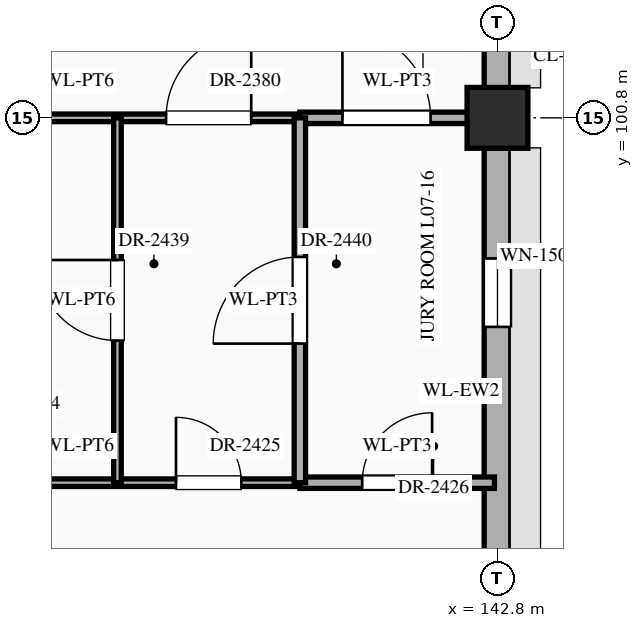
"""IFC4 building model, lengths in metres.
Left out: names, types, materials, properties, quantities, classifications, styles, units other than length and angle.
Written with IfcOpenShell. Run it as: python <this file> out.ifc"""

import sys

from ifc_helpers import new_model, si_unit, direction, frame, frame_2d, origin, origin_2d, place, context, subcontext, project, spatial, rectangle, extrude, element, fill, save


model = new_model("IFC4")
c1 = context("Model", 3, precision=1e-05, world=origin(), true_north=direction((0.0, 1.0)))
c2 = subcontext(c1, "Body", "Model", "MODEL_VIEW")
j1 = project(units=[si_unit("LENGTHUNIT", "METRE"), si_unit("PLANEANGLEUNIT", "RADIAN")], contexts=[c1])
p1 = place(None, origin())
s1 = spatial("IfcSite", under=j1, at=p1, CompositionType="ELEMENT")
p2 = place(p1, origin())
s2 = spatial("IfcBuilding", under=s1, at=p2, CompositionType="ELEMENT")
p3 = place(p2, frame((0.0, 0.0, 30.6)))
s3 = spatial("IfcBuildingStorey", under=s2, at=p3, CompositionType="ELEMENT", Elevation=30.6)
p4 = place(p3, frame((142.8, 100.8, 0.0), z_axis=(0.0, 0.0, 1.0), x_axis=(1.0, 0.0, 0.0)))
e1 = element("IfcColumn", 1, at=p4, inside=s3, PredefinedType="COLUMN", context=c2, shape_type="SweptSolid", body=[
    extrude(rectangle(XDim=0.8, YDim=0.8, at=origin_2d()), origin(), (0.0, 0.0, 1.0), 4.5),
])
p5 = place(p3, frame((142.8, 93.995, 0.0), z_axis=(0.0, 0.0, 1.0), x_axis=(0.0, 1.0, 0.0)))
e2 = element("IfcWall", 2, at=p5, inside=s3, PredefinedType="STANDARD", context=c2, shape_type="SweptSolid", body=[
    extrude(rectangle(XDim=6.41, YDim=0.35, at=frame_2d((3.205, 0.0))), origin(), (0.0, 0.0, 1.0), 3.65),
])
p6 = place(p5, frame((4.055, 0.0, 0.85)))
e3 = element("IfcOpeningElement", 3, at=p6, cuts=e2, PredefinedType="OPENING", context=c2, shape_type="SweptSolid", body=[
    extrude(rectangle(XDim=0.9, YDim=2.12, at=frame_2d((0.45, 1.06))), frame((0.0, 0.187, 0.0), z_axis=(0.0, -1.0, 0.0), x_axis=(1.0, 0.0, 0.0)), (0.0, 0.0, 1.0), 0.374),
])
p7 = place(p3, frame((142.8, 101.195, 0.0), z_axis=(0.0, 0.0, 1.0), x_axis=(0.0, 1.0, 0.0)))
e4 = element("IfcWall", 4, at=p7, inside=s3, PredefinedType="STANDARD", context=c2, shape_type="SweptSolid", body=[
    extrude(rectangle(XDim=6.41, YDim=0.35, at=frame_2d((3.205, 0.0))), origin(), (0.0, 0.0, 1.0), 3.65),
])
p8 = place(p7, frame((3.98, 0.0, 0.85)))
e5 = element("IfcOpeningElement", 5, at=p8, cuts=e4, PredefinedType="OPENING", context=c2, shape_type="SweptSolid", body=[
    extrude(rectangle(XDim=1.05, YDim=1.2, at=frame_2d((0.525, 0.6))), frame((0.0, 0.187, 0.0), z_axis=(0.0, -1.0, 0.0), x_axis=(1.0, 0.0, 0.0)), (0.0, 0.0, 1.0), 0.374),
])
p9 = place(p3, frame((134.4, 96.0, 0.0), z_axis=(0.0, 0.0, 1.0), x_axis=(1.0, 0.0, 0.0)))
e6 = element("IfcWall", 6, at=p9, inside=s3, PredefinedType="STANDARD", context=c2, shape_type="SweptSolid", body=[
    extrude(rectangle(XDim=5.8, YDim=0.1, at=frame_2d((2.9, 0.0))), origin(), (0.0, 0.0, 1.0), 4.3),
])
p10 = place(p9, frame((1.25, 0.0, 0.0)))
e7 = element("IfcOpeningElement", 7, at=p10, cuts=e6, PredefinedType="OPENING", context=c2, shape_type="SweptSolid", body=[
    extrude(rectangle(XDim=0.9, YDim=2.15, at=frame_2d((0.45, 1.075))), frame((0.0, 0.062, 0.0), z_axis=(0.0, -1.0, 0.0), x_axis=(1.0, 0.0, 0.0)), (0.0, 0.0, 1.0), 0.124),
])
p11 = place(p9, frame((4.17, 0.0, 0.0)))
e8 = element("IfcOpeningElement", 8, at=p11, cuts=e6, PredefinedType="OPENING", context=c2, shape_type="SweptSolid", body=[
    extrude(rectangle(XDim=0.86, YDim=2.1, at=frame_2d((0.43, 1.05))), frame((0.0, 0.062, 0.0), z_axis=(0.0, -1.0, 0.0), x_axis=(1.0, 0.0, 0.0)), (0.0, 0.0, 1.0), 0.124),
])
p12 = place(p3, frame((140.2, 96.0, 0.0), z_axis=(0.0, 0.0, 1.0), x_axis=(1.0, 0.0, 0.0)))
e9 = element("IfcWall", 9, at=p12, inside=s3, PredefinedType="STANDARD", context=c2, shape_type="SweptSolid", body=[
    extrude(rectangle(XDim=2.56, YDim=0.15, at=frame_2d((1.28, 0.0))), origin(), (0.0, 0.0, 1.0), 4.3),
])
p13 = place(p12, frame((0.82, 0.0, 0.0)))
e10 = element("IfcOpeningElement", 10, at=p13, cuts=e9, PredefinedType="OPENING", context=c2, shape_type="SweptSolid", body=[
    extrude(rectangle(XDim=0.92, YDim=2.15, at=frame_2d((0.46, 1.075))), frame((0.0, 0.087, 0.0), z_axis=(0.0, -1.0, 0.0), x_axis=(1.0, 0.0, 0.0)), (0.0, 0.0, 1.0), 0.174),
])
p14 = place(p3, frame((134.4, 100.8, 0.0), z_axis=(0.0, 0.0, 1.0), x_axis=(1.0, 0.0, 0.0)))
e11 = element("IfcWall", 11, at=p14, inside=s3, PredefinedType="STANDARD", context=c2, shape_type="SweptSolid", body=[
    extrude(rectangle(XDim=5.8, YDim=0.1, at=frame_2d((2.9, 0.0))), origin(), (0.0, 0.0, 1.0), 3.45),
])
p15 = place(p14, frame((1.32, 0.0, 0.0)))
e12 = element("IfcOpeningElement", 12, at=p15, cuts=e11, PredefinedType="OPENING", context=c2, shape_type="SweptSolid", body=[
    extrude(rectangle(XDim=1.08, YDim=2.25, at=frame_2d((0.54, 1.125))), frame((0.0, 0.062, 0.0), z_axis=(0.0, -1.0, 0.0), x_axis=(1.0, 0.0, 0.0)), (0.0, 0.0, 1.0), 0.124),
])
p16 = place(p14, frame((4.04, 0.0, 0.0)))
e13 = element("IfcOpeningElement", 13, at=p16, cuts=e11, PredefinedType="OPENING", context=c2, shape_type="SweptSolid", body=[
    extrude(rectangle(XDim=1.12, YDim=2.25, at=frame_2d((0.56, 1.125))), frame((0.0, 0.062, 0.0), z_axis=(0.0, -1.0, 0.0), x_axis=(1.0, 0.0, 0.0)), (0.0, 0.0, 1.0), 0.124),
])
p17 = place(p3, frame((140.2, 100.8, 0.0), z_axis=(0.0, 0.0, 1.0), x_axis=(1.0, 0.0, 0.0)))
e14 = element("IfcWall", 14, at=p17, inside=s3, PredefinedType="STANDARD", context=c2, shape_type="SweptSolid", body=[
    extrude(rectangle(XDim=2.56, YDim=0.15, at=frame_2d((1.28, 0.0))), origin(), (0.0, 0.0, 1.0), 3.45),
])
p18 = place(p17, frame((0.56, 0.0, 0.0)))
e15 = element("IfcOpeningElement", 15, at=p18, cuts=e14, PredefinedType="OPENING", context=c2, shape_type="SweptSolid", body=[
    extrude(rectangle(XDim=1.16, YDim=2.3, at=frame_2d((0.58, 1.15))), frame((0.0, 0.087, 0.0), z_axis=(0.0, -1.0, 0.0), x_axis=(1.0, 0.0, 0.0)), (0.0, 0.0, 1.0), 0.174),
])
p19 = place(p3, frame((137.8, 96.0, 0.0), z_axis=(0.0, 0.0, 1.0), x_axis=(0.0, 1.0, 0.0)))
e16 = element("IfcWall", 16, at=p19, inside=s3, PredefinedType="STANDARD", context=c2, shape_type="SweptSolid", body=[
    extrude(rectangle(XDim=4.8, YDim=0.1, at=frame_2d((2.4, 0.0))), origin(), (0.0, 0.0, 1.0), 4.3),
])
p20 = place(p19, frame((1.87, 0.0, 0.0)))
e17 = element("IfcOpeningElement", 17, at=p20, cuts=e16, PredefinedType="OPENING", context=c2, shape_type="SweptSolid", body=[
    extrude(rectangle(XDim=1.06, YDim=2.4, at=frame_2d((0.53, 1.2))), frame((0.0, 0.062, 0.0), z_axis=(0.0, -1.0, 0.0), x_axis=(1.0, 0.0, 0.0)), (0.0, 0.0, 1.0), 0.124),
])
p21 = place(p3, frame((140.2, 96.0, 0.0), z_axis=(0.0, 0.0, 1.0), x_axis=(0.0, 1.0, 0.0)))
e18 = element("IfcWall", 18, at=p21, inside=s3, PredefinedType="STANDARD", context=c2, shape_type="SweptSolid", body=[
    extrude(rectangle(XDim=4.8, YDim=0.15, at=frame_2d((2.4, 0.0))), origin(), (0.0, 0.0, 1.0), 4.3),
])
p22 = place(p21, frame((1.83, 0.0, 0.0)))
e19 = element("IfcOpeningElement", 19, at=p22, cuts=e18, PredefinedType="OPENING", context=c2, shape_type="SweptSolid", body=[
    extrude(rectangle(XDim=1.14, YDim=2.4, at=frame_2d((0.57, 1.2))), frame((0.0, 0.087, 0.0), z_axis=(0.0, -1.0, 0.0), x_axis=(1.0, 0.0, 0.0)), (0.0, 0.0, 1.0), 0.174),
])
p23 = place(p6, origin())
e20 = element("IfcWindow", 20, at=p23, inside=s3, PartitioningType="SINGLE_PANEL", PredefinedType="WINDOW", context=c2, shape_type="SweptSolid", body=[
    extrude(rectangle(XDim=0.9, YDim=2.12, at=frame_2d((0.45, 1.06))), frame((0.0, 0.03, 0.0), z_axis=(0.0, -1.0, 0.0), x_axis=(1.0, 0.0, 0.0)), (0.0, 0.0, 1.0), 0.06),
])
fill(e3, e20)
p24 = place(p16, origin())
e21 = element("IfcDoor", 21, at=p24, inside=s3, OperationType="SINGLE_SWING_RIGHT", PredefinedType="DOOR", context=c2, shape_type="SweptSolid", body=[
    extrude(rectangle(XDim=1.12, YDim=2.25, at=frame_2d((0.56, 1.125))), frame((0.0, 0.025, 0.0), z_axis=(0.0, -1.0, 0.0), x_axis=(1.0, 0.0, 0.0)), (0.0, 0.0, 1.0), 0.05),
])
fill(e13, e21)
p25 = place(p18, origin())
e22 = element("IfcDoor", 22, at=p25, inside=s3, OperationType="SINGLE_SWING_LEFT", PredefinedType="DOOR", context=c2, shape_type="SweptSolid", body=[
    extrude(rectangle(XDim=1.16, YDim=2.3, at=frame_2d((0.58, 1.15))), frame((0.0, 0.025, 0.0), z_axis=(0.0, -1.0, 0.0), x_axis=(1.0, 0.0, 0.0)), (0.0, 0.0, 1.0), 0.05),
])
fill(e15, e22)
p26 = place(p11, origin())
e23 = element("IfcDoor", 23, at=p26, inside=s3, OperationType="SINGLE_SWING_LEFT", PredefinedType="DOOR", context=c2, shape_type="SweptSolid", body=[
    extrude(rectangle(XDim=0.86, YDim=2.1, at=frame_2d((0.43, 1.05))), frame((0.0, 0.025, 0.0), z_axis=(0.0, -1.0, 0.0), x_axis=(1.0, 0.0, 0.0)), (0.0, 0.0, 1.0), 0.05),
])
fill(e8, e23)
p27 = place(p13, origin())
e24 = element("IfcDoor", 24, at=p27, inside=s3, OperationType="SINGLE_SWING_RIGHT", PredefinedType="DOOR", context=c2, shape_type="SweptSolid", body=[
    extrude(rectangle(XDim=0.92, YDim=2.15, at=frame_2d((0.46, 1.075))), frame((0.0, 0.025, 0.0), z_axis=(0.0, -1.0, 0.0), x_axis=(1.0, 0.0, 0.0)), (0.0, 0.0, 1.0), 0.05),
])
fill(e10, e24)
p28 = place(p20, origin())
e25 = element("IfcDoor", 25, at=p28, inside=s3, OperationType="SINGLE_SWING_RIGHT", PredefinedType="DOOR", context=c2, shape_type="SweptSolid", body=[
    extrude(rectangle(XDim=1.06, YDim=2.4, at=frame_2d((0.53, 1.2))), frame((0.0, 0.025, 0.0), z_axis=(0.0, -1.0, 0.0), x_axis=(1.0, 0.0, 0.0)), (0.0, 0.0, 1.0), 0.05),
])
fill(e17, e25)
p29 = place(p22, origin())
e26 = element("IfcDoor", 26, at=p29, inside=s3, OperationType="SINGLE_SWING_LEFT", PredefinedType="DOOR", context=c2, shape_type="SweptSolid", body=[
    extrude(rectangle(XDim=1.14, YDim=2.4, at=frame_2d((0.57, 1.2))), frame((0.0, 0.025, 0.0), z_axis=(0.0, -1.0, 0.0), x_axis=(1.0, 0.0, 0.0)), (0.0, 0.0, 1.0), 0.05),
])
fill(e19, e26)
save(model, sys.argv[1])
